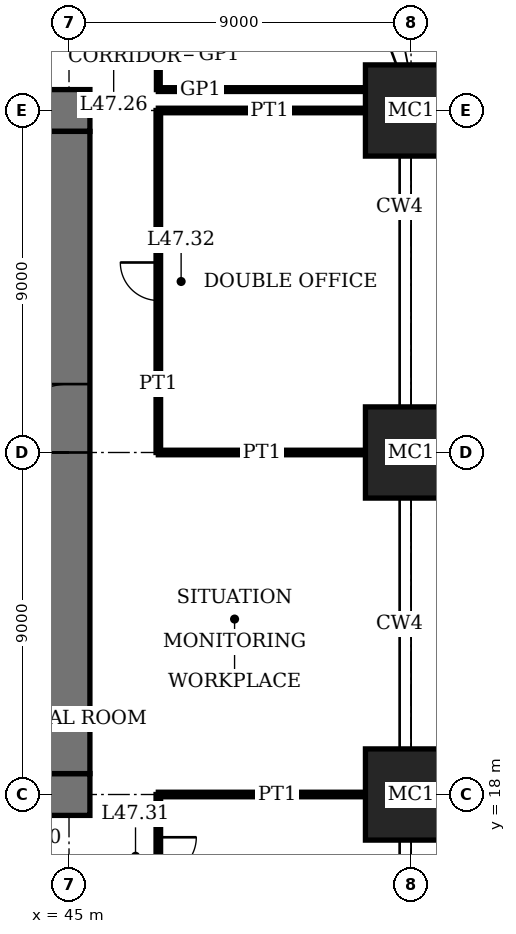
"""IFC4 building model, lengths in metres.
Left out: names, types, materials, properties, quantities, classifications, styles, units other than length and angle.
Written with IfcOpenShell. Run it as: python <this file> out.ifc"""

import sys

from ifc_helpers import new_model, si_unit, direction, frame, frame_2d, origin, origin_2d, place, context, subcontext, project, spatial, rectangle, extrude, element, fill, save


model = new_model("IFC4")
c1 = context("Model", 3, precision=1e-05, world=origin(), true_north=direction((0.0, 1.0)))
c2 = subcontext(c1, "Body", "Model", "MODEL_VIEW")
j1 = project(units=[si_unit("LENGTHUNIT", "METRE"), si_unit("PLANEANGLEUNIT", "RADIAN")], contexts=[c1])
p1 = place(None, origin())
s1 = spatial("IfcSite", under=j1, at=p1, CompositionType="ELEMENT")
p2 = place(p1, origin())
s2 = spatial("IfcBuilding", under=s1, at=p2, CompositionType="ELEMENT")
p3 = place(p2, frame((0.0, 0.0, 194.2)))
s3 = spatial("IfcBuildingStorey", under=s2, at=p3, CompositionType="ELEMENT", Elevation=194.2)
for number, where, z_axis, x_axis in (
    (1, (54.0, 18.0, 0.0), (0.0, 0.0, 1.0), (1.0, 0.0, 0.0)),
    (2, (54.0, 27.0, 0.0), (0.0, 0.0, 1.0), (1.0, 0.0, 0.0)),
    (3, (54.0, 36.0, 0.0), (0.0, 0.0, 1.0), (1.0, 0.0, 0.0)),
):
    element("IfcColumn", number, at=place(p3, frame(where, z_axis=z_axis, x_axis=x_axis)), inside=s3, PredefinedType="COLUMN", context=c2, shape_type="SweptSolid", body=[
        extrude(rectangle(XDim=2.4, YDim=2.4, at=origin_2d()), origin(), (0.0, 0.0, 1.0), 4.0),
    ])
p4 = place(p3, frame((17.45, 18.0, 0.0), z_axis=(0.0, 0.0, 1.0), x_axis=(1.0, 0.0, 0.0)))
e4 = element("IfcWall", 4, at=p4, inside=s3, PredefinedType="SHEAR", context=c2, shape_type="SweptSolid", body=[
    extrude(rectangle(XDim=28.1, YDim=1.1, at=frame_2d((14.05, 0.0))), origin(), (0.0, 0.0, 1.0), 4.0),
])
p5 = place(p4, frame((11.55, 0.0, 0.0)))
e5 = element("IfcOpeningElement", 5, at=p5, cuts=e4, PredefinedType="OPENING", context=c2, shape_type="SweptSolid", body=[
    extrude(rectangle(XDim=1.0, YDim=2.4, at=frame_2d((0.5, 1.2))), frame((0.0, 0.56, 0.0), z_axis=(0.0, -1.0, 0.0), x_axis=(1.0, 0.0, 0.0)), (0.0, 0.0, 1.0), 1.12),
])
p6 = place(p4, frame((16.55, 0.0, 0.0)))
e6 = element("IfcOpeningElement", 6, at=p6, cuts=e4, PredefinedType="OPENING", context=c2, shape_type="SweptSolid", body=[
    extrude(rectangle(XDim=1.0, YDim=2.4, at=frame_2d((0.5, 1.2))), frame((0.0, 0.56, 0.0), z_axis=(0.0, -1.0, 0.0), x_axis=(1.0, 0.0, 0.0)), (0.0, 0.0, 1.0), 1.12),
])
p7 = place(p4, frame((20.0, 0.0, 0.0)))
e7 = element("IfcOpeningElement", 7, at=p7, cuts=e4, PredefinedType="OPENING", context=c2, shape_type="SweptSolid", body=[
    extrude(rectangle(XDim=1.1, YDim=2.4, at=frame_2d((0.55, 1.2))), frame((0.0, 0.56, 0.0), z_axis=(0.0, -1.0, 0.0), x_axis=(1.0, 0.0, 0.0)), (0.0, 0.0, 1.0), 1.12),
])
p8 = place(p4, frame((24.05, 0.0, 0.0)))
e8 = element("IfcOpeningElement", 8, at=p8, cuts=e4, PredefinedType="OPENING", context=c2, shape_type="SweptSolid", body=[
    extrude(rectangle(XDim=1.0, YDim=2.4, at=frame_2d((0.5, 1.2))), frame((0.0, 0.56, 0.0), z_axis=(0.0, -1.0, 0.0), x_axis=(1.0, 0.0, 0.0)), (0.0, 0.0, 1.0), 1.12),
])
p9 = place(p3, frame((45.55, 36.0, 0.0), z_axis=(0.0, 0.0, 1.0), x_axis=(-1.0, 0.0, 0.0)))
e9 = element("IfcWall", 9, at=p9, inside=s3, PredefinedType="SHEAR", context=c2, shape_type="SweptSolid", body=[
    extrude(rectangle(XDim=28.1, YDim=1.1, at=frame_2d((14.05, 0.0))), origin(), (0.0, 0.0, 1.0), 4.0),
])
p10 = place(p9, frame((11.55, 0.0, 0.0)))
e10 = element("IfcOpeningElement", 10, at=p10, cuts=e9, PredefinedType="OPENING", context=c2, shape_type="SweptSolid", body=[
    extrude(rectangle(XDim=1.0, YDim=2.4, at=frame_2d((0.5, 1.2))), frame((0.0, 0.56, 0.0), z_axis=(0.0, -1.0, 0.0), x_axis=(1.0, 0.0, 0.0)), (0.0, 0.0, 1.0), 1.12),
])
p11 = place(p9, frame((16.55, 0.0, 0.0)))
e11 = element("IfcOpeningElement", 11, at=p11, cuts=e9, PredefinedType="OPENING", context=c2, shape_type="SweptSolid", body=[
    extrude(rectangle(XDim=1.0, YDim=2.4, at=frame_2d((0.5, 1.2))), frame((0.0, 0.56, 0.0), z_axis=(0.0, -1.0, 0.0), x_axis=(1.0, 0.0, 0.0)), (0.0, 0.0, 1.0), 1.12),
])
p12 = place(p9, frame((20.0, 0.0, 0.0)))
e12 = element("IfcOpeningElement", 12, at=p12, cuts=e9, PredefinedType="OPENING", context=c2, shape_type="SweptSolid", body=[
    extrude(rectangle(XDim=1.1, YDim=2.4, at=frame_2d((0.55, 1.2))), frame((0.0, 0.56, 0.0), z_axis=(0.0, -1.0, 0.0), x_axis=(1.0, 0.0, 0.0)), (0.0, 0.0, 1.0), 1.12),
])
p13 = place(p9, frame((24.05, 0.0, 0.0)))
e13 = element("IfcOpeningElement", 13, at=p13, cuts=e9, PredefinedType="OPENING", context=c2, shape_type="SweptSolid", body=[
    extrude(rectangle(XDim=1.0, YDim=2.4, at=frame_2d((0.5, 1.2))), frame((0.0, 0.56, 0.0), z_axis=(0.0, -1.0, 0.0), x_axis=(1.0, 0.0, 0.0)), (0.0, 0.0, 1.0), 1.12),
])
p14 = place(p3, frame((45.0, 18.55, 0.0), z_axis=(0.0, 0.0, 1.0), x_axis=(0.0, 1.0, 0.0)))
e14 = element("IfcWall", 14, at=p14, inside=s3, PredefinedType="SHEAR", context=c2, shape_type="SweptSolid", body=[
    extrude(rectangle(XDim=16.9, YDim=1.1, at=frame_2d((8.45, 0.0))), origin(), (0.0, 0.0, 1.0), 4.0),
])
p15 = place(p14, frame((8.45, 0.0, 0.0)))
e15 = element("IfcOpeningElement", 15, at=p15, cuts=e14, PredefinedType="OPENING", context=c2, shape_type="SweptSolid", body=[
    extrude(rectangle(XDim=1.8, YDim=2.4, at=frame_2d((0.9, 1.2))), frame((0.0, 0.56, 0.0), z_axis=(0.0, -1.0, 0.0), x_axis=(1.0, 0.0, 0.0)), (0.0, 0.0, 1.0), 1.12),
])
for number, where, z_axis, x_axis in (
    (16, (47.35, 18.0, 0.0), (0.0, 0.0, 1.0), (1.0, 0.0, 0.0)),
    (17, (47.35, 27.0, 0.0), (0.0, 0.0, 1.0), (1.0, 0.0, 0.0)),
    (18, (47.35, 36.0, 0.0), (0.0, 0.0, 1.0), (1.0, 0.0, 0.0)),
):
    element("IfcWall", number, at=place(p3, frame(where, z_axis=z_axis, x_axis=x_axis)), inside=s3, PredefinedType="PARTITIONING", context=c2, shape_type="SweptSolid", body=[
        extrude(rectangle(XDim=5.45, YDim=0.12, at=frame_2d((2.725, 0.0))), origin(), (0.0, 0.0, 1.0), 3.05),
    ])
p16 = place(p3, frame((47.35, 36.55, 0.0), z_axis=(0.0, 0.0, 1.0), x_axis=(1.0, 0.0, 0.0)))
e19 = element("IfcWall", 19, at=p16, inside=s3, PredefinedType="PARTITIONING", context=c2, shape_type="SweptSolid", body=[
    extrude(rectangle(XDim=5.45, YDim=0.1, at=frame_2d((2.725, 0.0))), origin(), (0.0, 0.0, 1.0), 3.75),
])
p17 = place(p3, frame((47.35, 13.25, 0.0), z_axis=(0.0, 0.0, 1.0), x_axis=(0.0, 1.0, 0.0)))
e20 = element("IfcWall", 20, at=p17, inside=s3, PredefinedType="PARTITIONING", context=c2, shape_type="SweptSolid", body=[
    extrude(rectangle(XDim=4.75, YDim=0.12, at=frame_2d((2.375, 0.0))), origin(), (0.0, 0.0, 1.0), 3.75),
])
p18 = place(p17, frame((2.625, 0.0, 0.0)))
e21 = element("IfcOpeningElement", 21, at=p18, cuts=e20, PredefinedType="OPENING", context=c2, shape_type="SweptSolid", body=[
    extrude(rectangle(XDim=1.0, YDim=2.4, at=frame_2d((0.5, 1.2))), frame((0.0, 0.07, 0.0), z_axis=(0.0, -1.0, 0.0), x_axis=(1.0, 0.0, 0.0)), (0.0, 0.0, 1.0), 0.14),
])
p19 = place(p3, frame((47.35, 27.0, 0.0), z_axis=(0.0, 0.0, 1.0), x_axis=(0.0, 1.0, 0.0)))
e22 = element("IfcWall", 22, at=p19, inside=s3, PredefinedType="PARTITIONING", context=c2, shape_type="SweptSolid", body=[
    extrude(rectangle(XDim=9.0, YDim=0.12, at=frame_2d((4.5, 0.0))), origin(), (0.0, 0.0, 1.0), 3.75),
])
p20 = place(p19, frame((4.0, 0.0, 0.0)))
e23 = element("IfcOpeningElement", 23, at=p20, cuts=e22, PredefinedType="OPENING", context=c2, shape_type="SweptSolid", body=[
    extrude(rectangle(XDim=1.0, YDim=2.4, at=frame_2d((0.5, 1.2))), frame((0.0, 0.07, 0.0), z_axis=(0.0, -1.0, 0.0), x_axis=(1.0, 0.0, 0.0)), (0.0, 0.0, 1.0), 0.14),
])
p21 = place(p3, frame((47.35, 36.55, 0.0), z_axis=(0.0, 0.0, 1.0), x_axis=(0.0, 1.0, 0.0)))
e24 = element("IfcWall", 24, at=p21, inside=s3, PredefinedType="PARTITIONING", context=c2, shape_type="SweptSolid", body=[
    extrude(rectangle(XDim=1.8, YDim=0.1, at=frame_2d((0.9, 0.0))), origin(), (0.0, 0.0, 1.0), 3.75),
])
p22 = place(p15, origin())
e25 = element("IfcDoor", 25, at=p22, inside=s3, OperationType="DOUBLE_DOOR_DOUBLE_SWING", PredefinedType="DOOR", context=c2, shape_type="SweptSolid", body=[
    extrude(rectangle(XDim=1.8, YDim=2.4, at=frame_2d((0.9, 1.2))), frame((0.0, 0.03, 0.0), z_axis=(0.0, -1.0, 0.0), x_axis=(1.0, 0.0, 0.0)), (0.0, 0.0, 1.0), 0.06),
    extrude(rectangle(XDim=0.04, YDim=2.4, at=frame_2d((0.02, 1.2))), frame((0.0, 0.55, 0.0), z_axis=(0.0, -1.0, 0.0), x_axis=(1.0, 0.0, 0.0)), (0.0, 0.0, 1.0), 1.1),
    extrude(rectangle(XDim=0.04, YDim=2.4, at=frame_2d((1.78, 1.2))), frame((0.0, 0.55, 0.0), z_axis=(0.0, -1.0, 0.0), x_axis=(1.0, 0.0, 0.0)), (0.0, 0.0, 1.0), 1.1),
    extrude(rectangle(XDim=1.8, YDim=0.04, at=frame_2d((0.9, 2.38))), frame((0.0, 0.55, 0.0), z_axis=(0.0, -1.0, 0.0), x_axis=(1.0, 0.0, 0.0)), (0.0, 0.0, 1.0), 1.1),
])
fill(e15, e25)
p23 = place(p18, origin())
e26 = element("IfcDoor", 26, at=p23, inside=s3, OperationType="SINGLE_SWING_RIGHT", PredefinedType="DOOR", context=c2, shape_type="SweptSolid", body=[
    extrude(rectangle(XDim=1.0, YDim=2.4, at=frame_2d((0.5, 1.2))), frame((0.0, 0.025, 0.0), z_axis=(0.0, -1.0, 0.0), x_axis=(1.0, 0.0, 0.0)), (0.0, 0.0, 1.0), 0.05),
])
fill(e21, e26)
p24 = place(p20, origin())
e27 = element("IfcDoor", 27, at=p24, inside=s3, OperationType="SINGLE_SWING_LEFT", PredefinedType="DOOR", context=c2, shape_type="SweptSolid", body=[
    extrude(rectangle(XDim=1.0, YDim=2.4, at=frame_2d((0.5, 1.2))), frame((0.0, 0.025, 0.0), z_axis=(0.0, -1.0, 0.0), x_axis=(1.0, 0.0, 0.0)), (0.0, 0.0, 1.0), 0.05),
])
fill(e23, e27)
save(model, sys.argv[1])
